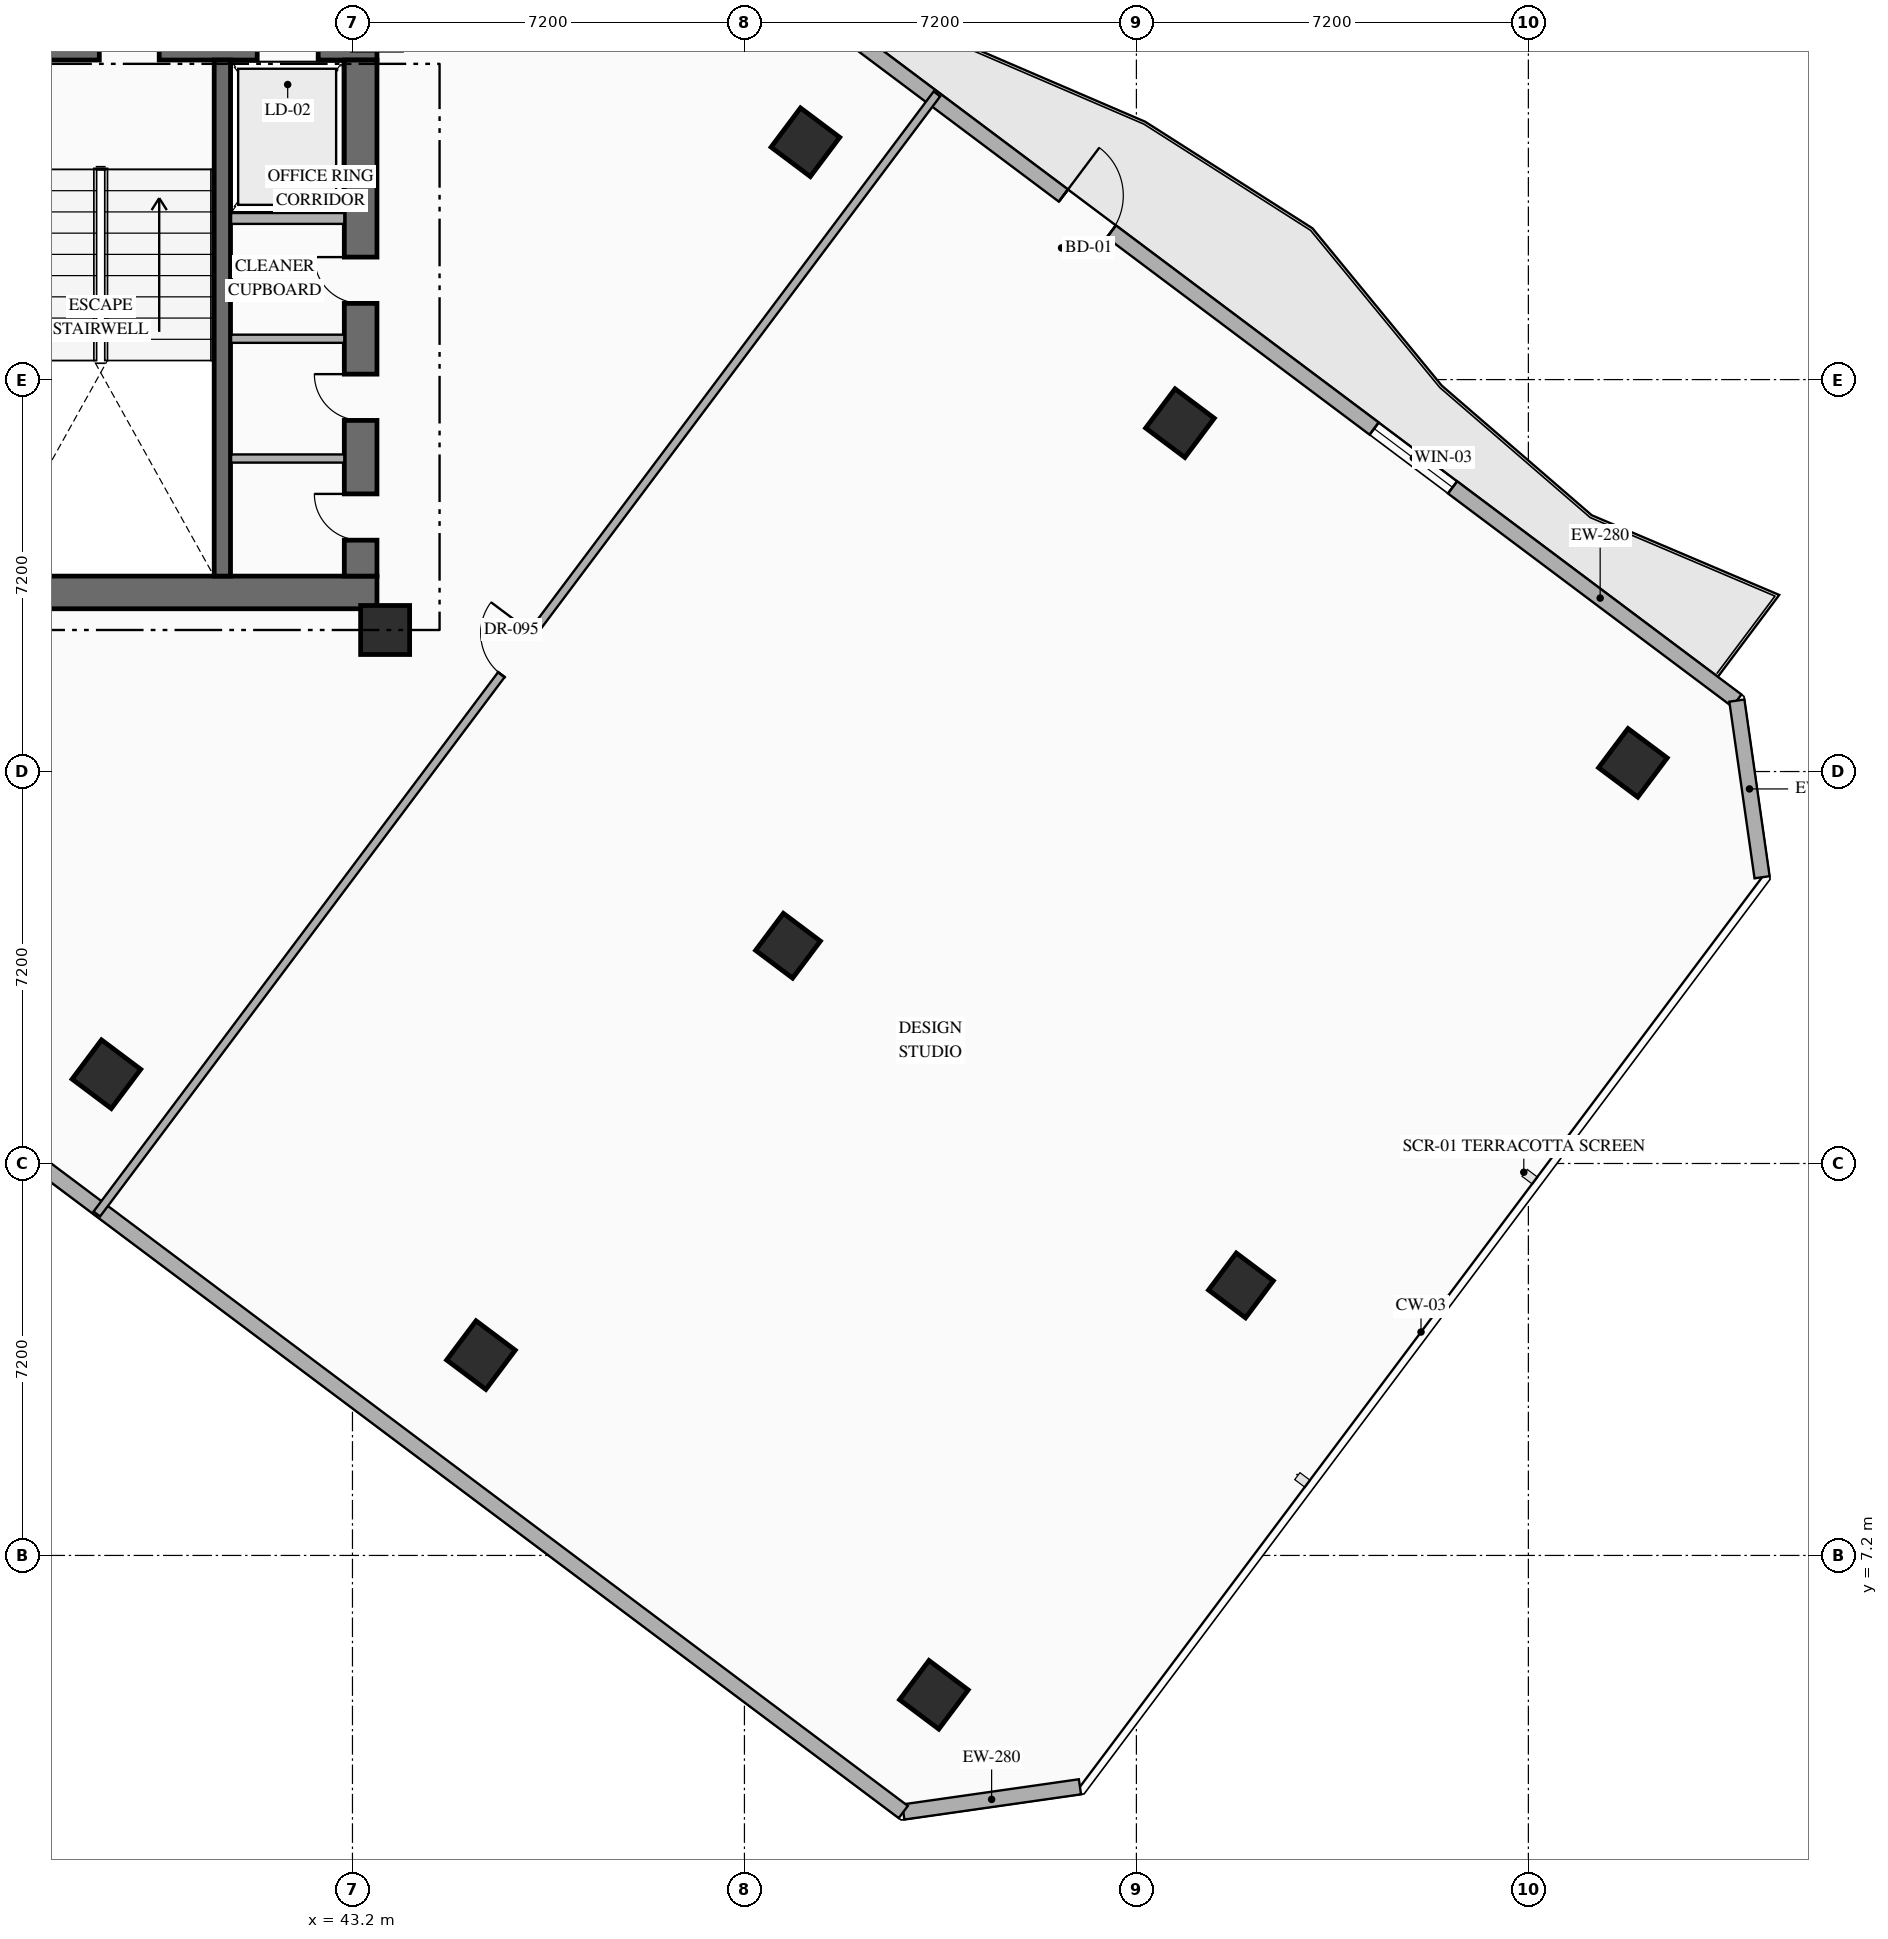
"""IFC4 building model, lengths in metres.
Left out: names, types, materials, properties, quantities, classifications, styles, units other than length and angle.
Written with IfcOpenShell. Run it as: python <this file> out.ifc"""

import sys

from ifc_helpers import new_model, si_unit, direction, frame, frame_2d, origin, origin_2d, place, context, subcontext, project, spatial, rectangle, hollow_rectangle, extrude, element, fill, save


model = new_model("IFC4")
c1 = context("Model", 3, precision=1e-05, world=origin(), true_north=direction((0.0, 1.0)))
c2 = subcontext(c1, "Body", "Model", "MODEL_VIEW")
j1 = project(units=[si_unit("LENGTHUNIT", "METRE"), si_unit("PLANEANGLEUNIT", "RADIAN")], contexts=[c1])
p1 = place(None, origin())
s1 = spatial("IfcSite", under=j1, at=p1, CompositionType="ELEMENT")
p2 = place(p1, origin())
s2 = spatial("IfcBuilding", under=s1, at=p2, CompositionType="ELEMENT")
p3 = place(p2, frame((0.0, 0.0, 126.45)))
s3 = spatial("IfcBuildingStorey", under=s2, at=p3, CompositionType="ELEMENT", Elevation=126.45)
p4 = place(p3, frame((35.89, 24.89, 0.0), z_axis=(0.0, 0.0, 1.0), x_axis=(1.0, 0.0, 0.0)))
e1 = element("IfcWall", 1, at=p4, inside=s3, PredefinedType="SHEAR", context=c2, shape_type="SweptSolid", body=[
    extrude(rectangle(XDim=7.76, YDim=0.6, at=frame_2d((3.88, 0.0))), origin(), (0.0, 0.0, 1.0), 3.6),
])
p5 = place(p3, frame((35.89, 34.97, 0.0), z_axis=(0.0, 0.0, 1.0), x_axis=(1.0, 0.0, 0.0)))
e2 = element("IfcWall", 2, at=p5, inside=s3, PredefinedType="SHEAR", context=c2, shape_type="SweptSolid", body=[
    extrude(rectangle(XDim=7.76, YDim=0.6, at=frame_2d((3.88, 0.0))), origin(), (0.0, 0.0, 1.0), 3.6),
])
p6 = place(p5, frame((2.66, 0.0, 0.0)))
e3 = element("IfcOpeningElement", 3, at=p6, cuts=e2, PredefinedType="OPENING", context=c2, shape_type="SweptSolid", body=[
    extrude(rectangle(XDim=1.1, YDim=2.2, at=frame_2d((0.55, 1.1))), frame((0.0, 0.31, 0.0), z_axis=(0.0, -1.0, 0.0), x_axis=(1.0, 0.0, 0.0)), (0.0, 0.0, 1.0), 0.62),
])
p7 = place(p5, frame((5.56, 0.0, 0.0)))
e4 = element("IfcOpeningElement", 4, at=p7, cuts=e2, PredefinedType="OPENING", context=c2, shape_type="SweptSolid", body=[
    extrude(rectangle(XDim=1.12, YDim=2.15, at=frame_2d((0.56, 1.075))), frame((0.0, 0.31, 0.0), z_axis=(0.0, -1.0, 0.0), x_axis=(1.0, 0.0, 0.0)), (0.0, 0.0, 1.0), 0.62),
])
p8 = place(p3, frame((43.35, 25.19, 0.0), z_axis=(0.0, 0.0, 1.0), x_axis=(0.0, 1.0, 0.0)))
e5 = element("IfcWall", 5, at=p8, inside=s3, PredefinedType="SHEAR", context=c2, shape_type="SweptSolid", body=[
    extrude(rectangle(XDim=9.48, YDim=0.6, at=frame_2d((4.74, 0.0))), origin(), (0.0, 0.0, 1.0), 3.6),
])
p9 = place(p8, frame((0.66, 0.0, 0.0)))
e6 = element("IfcOpeningElement", 6, at=p9, cuts=e5, PredefinedType="OPENING", context=c2, shape_type="SweptSolid", body=[
    extrude(rectangle(XDim=0.85, YDim=2.08, at=frame_2d((0.425, 1.04))), frame((0.0, 0.31, 0.0), z_axis=(0.0, -1.0, 0.0), x_axis=(1.0, 0.0, 0.0)), (0.0, 0.0, 1.0), 0.62),
])
p10 = place(p8, frame((2.86, 0.0, 0.0)))
e7 = element("IfcOpeningElement", 7, at=p10, cuts=e5, PredefinedType="OPENING", context=c2, shape_type="SweptSolid", body=[
    extrude(rectangle(XDim=0.85, YDim=2.08, at=frame_2d((0.425, 1.04))), frame((0.0, 0.31, 0.0), z_axis=(0.0, -1.0, 0.0), x_axis=(1.0, 0.0, 0.0)), (0.0, 0.0, 1.0), 0.62),
])
p11 = place(p8, frame((5.01, 0.0, 0.0)))
e8 = element("IfcOpeningElement", 8, at=p11, cuts=e5, PredefinedType="OPENING", context=c2, shape_type="SweptSolid", body=[
    extrude(rectangle(XDim=0.85, YDim=2.08, at=frame_2d((0.425, 1.04))), frame((0.0, 0.31, 0.0), z_axis=(0.0, -1.0, 0.0), x_axis=(1.0, 0.0, 0.0)), (0.0, 0.0, 1.0), 0.62),
])
p12 = place(p3, frame((40.81, 25.19, 0.0), z_axis=(0.0, 0.0, 1.0), x_axis=(0.0, 1.0, 0.0)))
e9 = element("IfcWall", 9, at=p12, inside=s3, PredefinedType="SHEAR", context=c2, shape_type="SweptSolid", body=[
    extrude(rectangle(XDim=9.48, YDim=0.3, at=frame_2d((4.74, 0.0))), origin(), (0.0, 0.0, 1.0), 3.6),
])
p13 = place(p3, frame((43.8, 24.2, 0.0), z_axis=(0.0, 0.0, 1.0), x_axis=(1.0, 0.0, 0.0)))
e10 = element("IfcColumn", 10, at=p13, inside=s3, PredefinedType="COLUMN", context=c2, shape_type="SweptSolid", body=[
    extrude(rectangle(XDim=0.9, YDim=0.9, at=origin_2d()), origin(), (0.0, 0.0, 1.0), 3.6),
])
for number, where, z_axis, x_axis in (
    (11, (38.68, 16.04, 0.0), (0.0, 0.0, 1.0), (0.8, -0.6, 0.0)),
    (12, (51.52, 33.16, 0.0), (0.0, 0.0, 1.0), (0.8, -0.6, 0.0)),
    (13, (45.56, 10.88, 0.0), (0.0, 0.0, 1.0), (0.8, -0.6, 0.0)),
    (14, (58.4, 28.0, 0.0), (0.0, 0.0, 1.0), (0.8, -0.6, 0.0)),
):
    element("IfcColumn", number, at=place(p3, frame(where, z_axis=z_axis, x_axis=x_axis)), inside=s3, PredefinedType="COLUMN", context=c2, shape_type="SweptSolid", body=[
        extrude(hollow_rectangle(XDim=0.9, YDim=0.9, WallThickness=0.036, at=origin_2d()), origin(), (0.0, 0.0, 1.0), 3.6),
    ])
p14 = place(p3, frame((51.2, 18.4, 0.0), z_axis=(0.0, 0.0, 1.0), x_axis=(0.799999996291, -0.600000004945, 0.0)))
e15 = element("IfcColumn", 15, at=p14, inside=s3, PredefinedType="COLUMN", context=c2, shape_type="SweptSolid", body=[
    extrude(hollow_rectangle(XDim=0.85, YDim=0.85, WallThickness=0.032, at=origin_2d()), origin(), (0.0, 0.0, 1.0), 3.6),
])
for number, where, z_axis, x_axis in (
    (16, (53.88, 4.64, 0.0), (0.0, 0.0, 1.0), (0.8, -0.6, 0.0)),
    (17, (66.72, 21.76, 0.0), (0.0, 0.0, 1.0), (0.8, -0.6, 0.0)),
):
    element("IfcColumn", number, at=place(p3, frame(where, z_axis=z_axis, x_axis=x_axis)), inside=s3, PredefinedType="COLUMN", context=c2, shape_type="SweptSolid", body=[
        extrude(hollow_rectangle(XDim=0.9, YDim=0.9, WallThickness=0.036, at=origin_2d()), origin(), (0.0, 0.0, 1.0), 3.318),
    ])
p15 = place(p3, frame((59.52, 12.16, 0.0), z_axis=(0.0, 0.0, 1.0), x_axis=(0.799999996291, -0.600000004945, 0.0)))
e18 = element("IfcColumn", 18, at=p15, inside=s3, PredefinedType="COLUMN", context=c2, shape_type="SweptSolid", body=[
    extrude(hollow_rectangle(XDim=0.85, YDim=0.85, WallThickness=0.032, at=origin_2d()), origin(), (0.0, 0.0, 1.0), 3.318),
])
p16 = place(p3, frame((44.86, 40.73, 0.0), z_axis=(0.0, 0.0, 1.0), x_axis=(0.800006902154, -0.599990797017, 0.0)))
e19 = element("IfcWall", 19, at=p16, inside=s3, PredefinedType="STANDARD", context=c2, shape_type="SweptSolid", body=[
    extrude(rectangle(XDim=29.712, YDim=0.28, at=frame_2d((14.856, 0.0))), origin(), (0.0, 0.0, 1.0), 3.34),
])
p17 = place(p16, frame((14.249, 0.0, 0.0)))
e20 = element("IfcOpeningElement", 20, at=p17, cuts=e19, PredefinedType="OPENING", context=c2, shape_type="SweptSolid", body=[
    extrude(rectangle(XDim=1.1, YDim=2.2, at=frame_2d((0.55, 1.1))), frame((0.0, 0.15, 0.0), z_axis=(0.0, -1.0, 0.0), x_axis=(1.0, 0.0, 0.0)), (0.0, 0.0, 1.0), 0.3),
])
p18 = place(p16, frame((6.528, 0.0, 0.85)))
e21 = element("IfcOpeningElement", 21, at=p18, cuts=e19, PredefinedType="OPENING", context=c2, shape_type="SweptSolid", body=[
    extrude(rectangle(XDim=1.8, YDim=2.1, at=frame_2d((0.9, 1.05))), frame((0.0, 0.15, 0.0), z_axis=(0.0, -1.0, 0.0), x_axis=(1.0, 0.0, 0.0)), (0.0, 0.0, 1.0), 0.3),
])
p19 = place(p16, frame((21.384, 0.0, 0.85)))
e22 = element("IfcOpeningElement", 22, at=p19, cuts=e19, PredefinedType="OPENING", context=c2, shape_type="SweptSolid", body=[
    extrude(rectangle(XDim=1.8, YDim=2.1, at=frame_2d((0.9, 1.05))), frame((0.0, 0.15, 0.0), z_axis=(0.0, -1.0, 0.0), x_axis=(1.0, 0.0, 0.0)), (0.0, 0.0, 1.0), 0.3),
])
p20 = place(p3, frame((68.63, 22.903, 0.0), z_axis=(0.0, 0.0, 1.0), x_axis=(0.141285803956, -0.989968848803, 0.0)))
e23 = element("IfcWall", 23, at=p20, inside=s3, PredefinedType="STANDARD", context=c2, shape_type="SweptSolid", body=[
    extrude(rectangle(XDim=3.278, YDim=0.28, at=frame_2d((1.639, 0.0))), origin(), (0.0, 0.0, 1.0), 3.34),
])
p21 = place(p3, frame((56.563, 2.95, 0.0), z_axis=(0.0, 0.0, 1.0), x_axis=(-0.989977778067, -0.141223223777, 0.0)))
e24 = element("IfcWall", 24, at=p21, inside=s3, PredefinedType="STANDARD", context=c2, shape_type="SweptSolid", body=[
    extrude(rectangle(XDim=3.278, YDim=0.28, at=frame_2d((1.639, 0.0))), origin(), (0.0, 0.0, 1.0), 3.34),
])
p22 = place(p3, frame((53.318, 2.487, 0.0), z_axis=(0.0, 0.0, 1.0), x_axis=(-0.800004174678, 0.599994433723, 0.0)))
e25 = element("IfcWall", 25, at=p22, inside=s3, PredefinedType="STANDARD", context=c2, shape_type="SweptSolid", body=[
    extrude(rectangle(XDim=35.089, YDim=0.28, at=frame_2d((17.544, 0.0))), origin(), (0.0, 0.0, 1.0), 3.34),
])
p23 = place(p3, frame((40.97, 31.76, 0.0), z_axis=(0.0, 0.0, 1.0), x_axis=(1.0, 0.0, 0.0)))
e26 = element("IfcWall", 26, at=p23, inside=s3, PredefinedType="STANDARD", context=c2, shape_type="SweptSolid", body=[
    extrude(rectangle(XDim=2.08, YDim=0.2, at=frame_2d((1.04, 0.0))), origin(), (0.0, 0.0, 1.0), 3.34),
])
for number, where, z_axis, x_axis in (
    (27, (40.97, 27.35, 0.0), (0.0, 0.0, 1.0), (1.0, 0.0, 0.0)),
    (28, (40.97, 29.55, 0.0), (0.0, 0.0, 1.0), (1.0, 0.0, 0.0)),
):
    element("IfcWall", number, at=place(p3, frame(where, z_axis=z_axis, x_axis=x_axis)), inside=s3, PredefinedType="PARTITIONING", context=c2, shape_type="SweptSolid", body=[
        extrude(rectangle(XDim=2.08, YDim=0.15, at=frame_2d((1.04, 0.0))), origin(), (0.0, 0.0, 1.0), 3.34),
    ])
p24 = place(p3, frame((38.504, 13.472, 0.0), z_axis=(0.0, 0.0, 1.0), x_axis=(0.6, 0.8, 0.0)))
e29 = element("IfcWall", 29, at=p24, inside=s3, PredefinedType="PARTITIONING", context=c2, shape_type="SweptSolid", body=[
    extrude(rectangle(XDim=25.72, YDim=0.15, at=frame_2d((12.86, 0.0))), origin(), (0.0, 0.0, 1.0), 3.34),
])
p25 = place(p24, frame((12.385, 0.0, 0.0)))
e30 = element("IfcOpeningElement", 30, at=p25, cuts=e29, PredefinedType="OPENING", context=c2, shape_type="SweptSolid", body=[
    extrude(rectangle(XDim=0.95, YDim=2.15, at=frame_2d((0.475, 1.075))), frame((0.0, 0.085, 0.0), z_axis=(0.0, -1.0, 0.0), x_axis=(1.0, 0.0, 0.0)), (0.0, 0.0, 1.0), 0.17),
])
p26 = place(p17, origin())
e31 = element("IfcDoor", 31, at=p26, inside=s3, OperationType="SINGLE_SWING_LEFT", PredefinedType="DOOR", context=c2, shape_type="SweptSolid", body=[
    extrude(rectangle(XDim=1.1, YDim=2.2, at=frame_2d((0.55, 1.1))), frame((0.0, 0.025, 0.0), z_axis=(0.0, -1.0, 0.0), x_axis=(1.0, 0.0, 0.0)), (0.0, 0.0, 1.0), 0.05),
])
fill(e20, e31)
p27 = place(p19, origin())
e32 = element("IfcWindow", 32, at=p27, inside=s3, PartitioningType="SINGLE_PANEL", PredefinedType="WINDOW", context=c2, shape_type="SweptSolid", body=[
    extrude(rectangle(XDim=1.8, YDim=2.1, at=frame_2d((0.9, 1.05))), frame((0.0, 0.03, 0.0), z_axis=(0.0, -1.0, 0.0), x_axis=(1.0, 0.0, 0.0)), (0.0, 0.0, 1.0), 0.06),
])
fill(e22, e32)
p28 = place(p9, origin())
e33 = element("IfcDoor", 33, at=p28, inside=s3, OperationType="SINGLE_SWING_RIGHT", PredefinedType="DOOR", context=c2, shape_type="SweptSolid", body=[
    extrude(rectangle(XDim=0.85, YDim=2.08, at=frame_2d((0.425, 1.04))), frame((0.0, 0.025, 0.0), z_axis=(0.0, -1.0, 0.0), x_axis=(1.0, 0.0, 0.0)), (0.0, 0.0, 1.0), 0.05),
])
fill(e6, e33)
p29 = place(p10, origin())
e34 = element("IfcDoor", 34, at=p29, inside=s3, OperationType="SINGLE_SWING_RIGHT", PredefinedType="DOOR", context=c2, shape_type="SweptSolid", body=[
    extrude(rectangle(XDim=0.85, YDim=2.08, at=frame_2d((0.425, 1.04))), frame((0.0, 0.025, 0.0), z_axis=(0.0, -1.0, 0.0), x_axis=(1.0, 0.0, 0.0)), (0.0, 0.0, 1.0), 0.05),
])
fill(e7, e34)
p30 = place(p11, origin())
e35 = element("IfcDoor", 35, at=p30, inside=s3, OperationType="SINGLE_SWING_RIGHT", PredefinedType="DOOR", context=c2, shape_type="SweptSolid", body=[
    extrude(rectangle(XDim=0.85, YDim=2.08, at=frame_2d((0.425, 1.04))), frame((0.0, 0.025, 0.0), z_axis=(0.0, -1.0, 0.0), x_axis=(1.0, 0.0, 0.0)), (0.0, 0.0, 1.0), 0.05),
])
fill(e8, e35)
p31 = place(p25, origin())
e36 = element("IfcDoor", 36, at=p31, inside=s3, OperationType="SINGLE_SWING_RIGHT", PredefinedType="DOOR", context=c2, shape_type="SweptSolid", body=[
    extrude(rectangle(XDim=0.95, YDim=2.15, at=frame_2d((0.475, 1.075))), frame((0.0, 0.025, 0.0), z_axis=(0.0, -1.0, 0.0), x_axis=(1.0, 0.0, 0.0)), (0.0, 0.0, 1.0), 0.05),
])
fill(e30, e36)
save(model, sys.argv[1])
